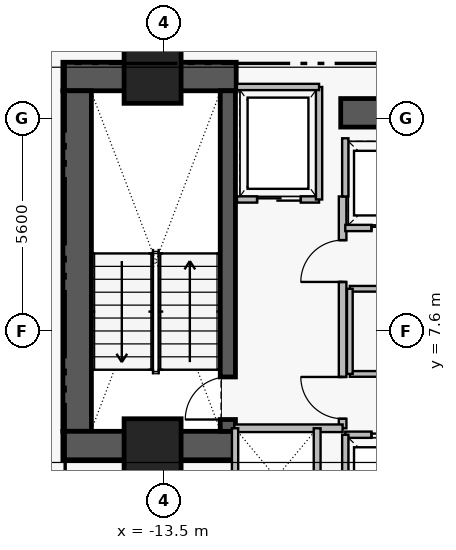
"""IFC4 building model, lengths in metres.
Left out: names, types, materials, properties, quantities, classifications, styles, units other than length and angle.
Written with IfcOpenShell. Run it as: python <this file> out.ifc"""

import sys

from ifc_helpers import new_model, si_unit, direction, frame, frame_2d, origin, origin_2d, place, context, subcontext, project, spatial, rectangle, extrude, element, fill, save


model = new_model("IFC4")
c1 = context("Model", 3, precision=1e-05, world=origin(), true_north=direction((0.0, 1.0)))
c2 = subcontext(c1, "Body", "Model", "MODEL_VIEW")
j1 = project(units=[si_unit("LENGTHUNIT", "METRE"), si_unit("PLANEANGLEUNIT", "RADIAN")], contexts=[c1])
p1 = place(None, origin())
s1 = spatial("IfcSite", under=j1, at=p1, CompositionType="ELEMENT")
p2 = place(p1, origin())
s2 = spatial("IfcBuilding", under=s1, at=p2, CompositionType="ELEMENT")
p3 = place(p2, frame((0.0, 0.0, 110.25)))
s3 = spatial("IfcBuildingStorey", under=s2, at=p3, CompositionType="ELEMENT", Elevation=110.25)
p4 = place(p3, frame((-16.16, 14.305, 0.0), z_axis=(0.0, 0.0, 1.0), x_axis=(1.0, 0.0, 0.0)))
e1 = element("IfcWall", 1, at=p4, inside=s3, PredefinedType="SHEAR", context=c2, shape_type="SweptSolid", body=[
    extrude(rectangle(XDim=4.56, YDim=0.75, at=frame_2d((2.28, 0.0))), origin(), (0.0, 0.0, 1.0), 3.46),
])
p5 = place(p3, frame((-15.785, 4.97, 0.0), z_axis=(0.0, 0.0, 1.0), x_axis=(0.0, 1.0, 0.0)))
e2 = element("IfcWall", 2, at=p5, inside=s3, PredefinedType="SHEAR", context=c2, shape_type="SweptSolid", body=[
    extrude(rectangle(XDim=8.96, YDim=0.75, at=frame_2d((4.48, 0.0))), origin(), (0.0, 0.0, 1.0), 3.46),
])
p6 = place(p3, frame((-16.16, 4.595, 0.0), z_axis=(0.0, 0.0, 1.0), x_axis=(1.0, 0.0, 0.0)))
e3 = element("IfcWall", 3, at=p6, inside=s3, PredefinedType="SHEAR", context=c2, shape_type="SweptSolid", body=[
    extrude(rectangle(XDim=4.56, YDim=0.75, at=frame_2d((2.28, 0.0))), origin(), (0.0, 0.0, 1.0), 3.46),
])
p7 = place(p3, frame((-8.85, 13.35, 0.0), z_axis=(0.0, 0.0, 1.0), x_axis=(1.0, 0.0, 0.0)))
e4 = element("IfcWall", 4, at=p7, inside=s3, PredefinedType="SHEAR", context=c2, shape_type="SweptSolid", body=[
    extrude(rectangle(XDim=7.6, YDim=0.75, at=frame_2d((3.8, 0.0))), origin(), (0.0, 0.0, 1.0), 3.43),
])
p8 = place(p3, frame((-11.82, 4.97, 0.0), z_axis=(0.0, 0.0, 1.0), x_axis=(0.0, 1.0, 0.0)))
e5 = element("IfcWall", 5, at=p8, inside=s3, PredefinedType="SHEAR", context=c2, shape_type="SweptSolid", body=[
    extrude(rectangle(XDim=8.96, YDim=0.4, at=frame_2d((4.48, 0.0))), origin(), (0.0, 0.0, 1.0), 3.46),
])
p9 = place(p8, frame((0.31, 0.0, 0.0)))
e6 = element("IfcOpeningElement", 6, at=p9, cuts=e5, PredefinedType="OPENING", context=c2, shape_type="SweptSolid", body=[
    extrude(rectangle(XDim=1.12, YDim=2.22, at=frame_2d((0.56, 1.11))), frame((0.0, 0.21, 0.0), z_axis=(0.0, -1.0, 0.0), x_axis=(1.0, 0.0, 0.0)), (0.0, 0.0, 1.0), 0.42),
])
for number, where, z_axis, x_axis in (
    (7, (-13.8, 14.35, 0.0), (0.0, 0.0, 1.0), (1.0, 0.0, 0.0)),
    (8, (-13.8, 4.55, 0.0), (0.0, 0.0, 1.0), (1.0, 0.0, 0.0)),
):
    element("IfcColumn", number, at=place(p3, frame(where, z_axis=z_axis, x_axis=x_axis)), inside=s3, PredefinedType="COLUMN", context=c2, shape_type="SweptSolid", body=[
        extrude(rectangle(XDim=1.5, YDim=1.5, at=origin_2d()), origin(), (0.0, 0.0, 1.0), 3.65),
    ])
p10 = place(p3, frame((-8.8, 5.05, 0.0), z_axis=(0.0, 0.0, 1.0), x_axis=(0.0, 1.0, 0.0)))
e9 = element("IfcWall", 9, at=p10, inside=s3, PredefinedType="PARTITIONING", context=c2, shape_type="SweptSolid", body=[
    extrude(rectangle(XDim=6.1, YDim=0.2, at=frame_2d((3.05, 0.0))), origin(), (0.0, 0.0, 1.0), 3.43),
])
p11 = place(p10, frame((0.25, 0.0, 0.0)))
e10 = element("IfcOpeningElement", 10, at=p11, cuts=e9, PredefinedType="OPENING", context=c2, shape_type="SweptSolid", body=[
    extrude(rectangle(XDim=1.1, YDim=2.2, at=frame_2d((0.55, 1.1))), frame((0.0, 0.11, 0.0), z_axis=(0.0, -1.0, 0.0), x_axis=(1.0, 0.0, 0.0)), (0.0, 0.0, 1.0), 0.22),
])
p12 = place(p10, frame((3.85, 0.0, 0.0)))
e11 = element("IfcOpeningElement", 11, at=p12, cuts=e9, PredefinedType="OPENING", context=c2, shape_type="SweptSolid", body=[
    extrude(rectangle(XDim=1.1, YDim=2.2, at=frame_2d((0.55, 1.1))), frame((0.0, 0.11, 0.0), z_axis=(0.0, -1.0, 0.0), x_axis=(1.0, 0.0, 0.0)), (0.0, 0.0, 1.0), 0.22),
])
p13 = place(p3, frame((-11.58, 11.07, 0.0), z_axis=(0.0, 0.0, 1.0), x_axis=(1.0, 0.0, 0.0)))
e12 = element("IfcWall", 12, at=p13, inside=s3, PredefinedType="PARTITIONING", context=c2, shape_type="SweptSolid", body=[
    extrude(rectangle(XDim=2.16, YDim=0.165, at=frame_2d((1.08, 0.0))), origin(), (0.0, 0.0, 1.0), 3.43),
])
p14 = place(p13, frame((0.53, 0.0, 0.0)))
e13 = element("IfcOpeningElement", 13, at=p14, cuts=e12, PredefinedType="OPENING", context=c2, shape_type="SweptSolid", body=[
    extrude(rectangle(XDim=1.15, YDim=2.25, at=frame_2d((0.575, 1.125))), frame((0.0, 0.093, 0.0), z_axis=(0.0, -1.0, 0.0), x_axis=(1.0, 0.0, 0.0)), (0.0, 0.0, 1.0), 0.185),
])
p15 = place(p3, frame((-8.73, 4.88, 0.0), z_axis=(0.0, 0.0, 1.0), x_axis=(1.0, 0.0, 0.0)))
e14 = element("IfcWall", 14, at=p15, inside=s3, PredefinedType="PARTITIONING", context=c2, shape_type="SweptSolid", body=[
    extrude(rectangle(XDim=2.48, YDim=0.165, at=frame_2d((1.24, 0.0))), origin(), (0.0, 0.0, 1.0), 3.43),
])
p16 = place(p15, frame((0.69, 0.0, 0.0)))
e15 = element("IfcOpeningElement", 15, at=p16, cuts=e14, PredefinedType="OPENING", context=c2, shape_type="SweptSolid", body=[
    extrude(rectangle(XDim=1.1, YDim=2.25, at=frame_2d((0.55, 1.125))), frame((0.0, 0.093, 0.0), z_axis=(0.0, -1.0, 0.0), x_axis=(1.0, 0.0, 0.0)), (0.0, 0.0, 1.0), 0.185),
])
p17 = place(p3, frame((-8.73, 10.32, 0.0), z_axis=(0.0, 0.0, 1.0), x_axis=(1.0, 0.0, 0.0)))
e16 = element("IfcWall", 16, at=p17, inside=s3, PredefinedType="PARTITIONING", context=c2, shape_type="SweptSolid", body=[
    extrude(rectangle(XDim=2.48, YDim=0.165, at=frame_2d((1.24, 0.0))), origin(), (0.0, 0.0, 1.0), 3.43),
])
p18 = place(p17, frame((0.69, 0.0, 0.0)))
e17 = element("IfcOpeningElement", 17, at=p18, cuts=e16, PredefinedType="OPENING", context=c2, shape_type="SweptSolid", body=[
    extrude(rectangle(XDim=1.1, YDim=2.25, at=frame_2d((0.55, 1.125))), frame((0.0, 0.093, 0.0), z_axis=(0.0, -1.0, 0.0), x_axis=(1.0, 0.0, 0.0)), (0.0, 0.0, 1.0), 0.185),
])
p19 = place(p3, frame((-8.61, 6.48, 0.0), z_axis=(0.0, 0.0, 1.0), x_axis=(1.0, 0.0, 0.0)))
e18 = element("IfcWall", 18, at=p19, inside=s3, PredefinedType="PARTITIONING", context=c2, shape_type="SweptSolid", body=[
    extrude(rectangle(XDim=3.62, YDim=0.15, at=frame_2d((1.81, 0.0))), origin(), (0.0, 0.0, 1.0), 3.43),
])
p20 = place(p19, frame((1.36, 0.0, 0.0)))
e19 = element("IfcOpeningElement", 19, at=p20, cuts=e18, PredefinedType="OPENING", context=c2, shape_type="SweptSolid", body=[
    extrude(rectangle(XDim=0.9, YDim=2.15, at=frame_2d((0.45, 1.075))), frame((0.0, 0.085, 0.0), z_axis=(0.0, -1.0, 0.0), x_axis=(1.0, 0.0, 0.0)), (0.0, 0.0, 1.0), 0.17),
])
p21 = place(p3, frame((-11.65, 5.05, 0.0), z_axis=(0.0, 0.0, 1.0), x_axis=(1.0, 0.0, 0.0)))
e20 = element("IfcWall", 20, at=p21, inside=s3, PredefinedType="PARTITIONING", context=c2, shape_type="SweptSolid", body=[
    extrude(rectangle(XDim=2.85, YDim=0.2, at=frame_2d((1.425, 0.0))), origin(), (0.0, 0.0, 1.0), 3.43),
])
p22 = place(p3, frame((-9.42, 11.07, 0.0), z_axis=(0.0, 0.0, 1.0), x_axis=(0.0, 1.0, 0.0)))
e21 = element("IfcWall", 21, at=p22, inside=s3, PredefinedType="PARTITIONING", context=c2, shape_type="SweptSolid", body=[
    extrude(rectangle(XDim=2.96, YDim=0.165, at=frame_2d((1.48, 0.0))), origin(), (0.0, 0.0, 1.0), 3.43),
])
p23 = place(p3, frame((-11.58, 14.03, 0.0), z_axis=(0.0, 0.0, 1.0), x_axis=(1.0, 0.0, 0.0)))
e22 = element("IfcWall", 22, at=p23, inside=s3, PredefinedType="PARTITIONING", context=c2, shape_type="SweptSolid", body=[
    extrude(rectangle(XDim=2.16, YDim=0.165, at=frame_2d((1.08, 0.0))), origin(), (0.0, 0.0, 1.0), 3.43),
])
p24 = place(p3, frame((-8.73, 2.52, 0.0), z_axis=(0.0, 0.0, 1.0), x_axis=(0.0, 1.0, 0.0)))
e23 = element("IfcWall", 23, at=p24, inside=s3, PredefinedType="PARTITIONING", context=c2, shape_type="SweptSolid", body=[
    extrude(rectangle(XDim=2.36, YDim=0.165, at=frame_2d((1.18, 0.0))), origin(), (0.0, 0.0, 1.0), 3.43),
])
p25 = place(p3, frame((-8.73, 11.15, 0.0), z_axis=(0.0, 0.0, 1.0), x_axis=(0.0, 1.0, 0.0)))
e24 = element("IfcWall", 24, at=p25, inside=s3, PredefinedType="PARTITIONING", context=c2, shape_type="SweptSolid", body=[
    extrude(rectangle(XDim=1.53, YDim=0.165, at=frame_2d((0.765, 0.0))), origin(), (0.0, 0.0, 1.0), 3.43),
])
p26 = place(p3, frame((-9.47, 2.45, 0.0), z_axis=(0.0, 0.0, 1.0), x_axis=(0.0, 1.0, 0.0)))
e25 = element("IfcWall", 25, at=p26, inside=s3, PredefinedType="PARTITIONING", context=c2, shape_type="SweptSolid", body=[
    extrude(rectangle(XDim=2.6, YDim=0.18, at=frame_2d((1.3, 0.0))), origin(), (0.0, 0.0, 1.0), 3.43),
])
p27 = place(p3, frame((-11.63, 2.47, 0.0), z_axis=(0.0, 0.0, 1.0), x_axis=(0.0, 1.0, 0.0)))
e26 = element("IfcWall", 26, at=p27, inside=s3, PredefinedType="PARTITIONING", context=c2, shape_type="SweptSolid", body=[
    extrude(rectangle(XDim=2.58, YDim=0.165, at=frame_2d((1.29, 0.0))), origin(), (0.0, 0.0, 1.0), 3.43),
])
p28 = place(p3, frame((-8.61, 8.72, 0.0), z_axis=(0.0, 0.0, 1.0), x_axis=(1.0, 0.0, 0.0)))
e27 = element("IfcWall", 27, at=p28, inside=s3, PredefinedType="PARTITIONING", context=c2, shape_type="SweptSolid", body=[
    extrude(rectangle(XDim=3.62, YDim=0.15, at=frame_2d((1.81, 0.0))), origin(), (0.0, 0.0, 1.0), 3.43),
])
p29 = place(p3, frame((-8.61, 6.48, 0.0), z_axis=(0.0, 0.0, 1.0), x_axis=(0.0, 1.0, 0.0)))
e28 = element("IfcWall", 28, at=p29, inside=s3, PredefinedType="PARTITIONING", context=c2, shape_type="SweptSolid", body=[
    extrude(rectangle(XDim=2.24, YDim=0.15, at=frame_2d((1.12, 0.0))), origin(), (0.0, 0.0, 1.0), 3.43),
])
p30 = place(p9, origin())
e29 = element("IfcDoor", 29, at=p30, inside=s3, OperationType="SINGLE_SWING_LEFT", PredefinedType="DOOR", context=c2, shape_type="SweptSolid", body=[
    extrude(rectangle(XDim=1.12, YDim=2.22, at=frame_2d((0.56, 1.11))), frame((0.0, 0.025, 0.0), z_axis=(0.0, -1.0, 0.0), x_axis=(1.0, 0.0, 0.0)), (0.0, 0.0, 1.0), 0.05),
])
fill(e6, e29)
p31 = place(p11, origin())
e30 = element("IfcDoor", 30, at=p31, inside=s3, OperationType="SINGLE_SWING_RIGHT", PredefinedType="DOOR", context=c2, shape_type="SweptSolid", body=[
    extrude(rectangle(XDim=1.1, YDim=2.2, at=frame_2d((0.55, 1.1))), frame((0.0, 0.025, 0.0), z_axis=(0.0, -1.0, 0.0), x_axis=(1.0, 0.0, 0.0)), (0.0, 0.0, 1.0), 0.05),
])
fill(e10, e30)
p32 = place(p12, origin())
e31 = element("IfcDoor", 31, at=p32, inside=s3, OperationType="SINGLE_SWING_LEFT", PredefinedType="DOOR", context=c2, shape_type="SweptSolid", body=[
    extrude(rectangle(XDim=1.1, YDim=2.2, at=frame_2d((0.55, 1.1))), frame((0.0, 0.025, 0.0), z_axis=(0.0, -1.0, 0.0), x_axis=(1.0, 0.0, 0.0)), (0.0, 0.0, 1.0), 0.05),
])
fill(e11, e31)
p33 = place(p14, origin())
e32 = element("IfcDoor", 32, at=p33, inside=s3, OperationType="SLIDING_TO_LEFT", PredefinedType="DOOR", context=c2, shape_type="SweptSolid", body=[
    extrude(rectangle(XDim=1.15, YDim=2.25, at=frame_2d((0.575, 1.125))), frame((0.0, 0.025, 0.0), z_axis=(0.0, -1.0, 0.0), x_axis=(1.0, 0.0, 0.0)), (0.0, 0.0, 1.0), 0.05),
])
fill(e13, e32)
p34 = place(p16, origin())
e33 = element("IfcDoor", 33, at=p34, inside=s3, OperationType="SLIDING_TO_LEFT", PredefinedType="DOOR", context=c2, shape_type="SweptSolid", body=[
    extrude(rectangle(XDim=1.1, YDim=2.25, at=frame_2d((0.55, 1.125))), frame((0.0, 0.025, 0.0), z_axis=(0.0, -1.0, 0.0), x_axis=(1.0, 0.0, 0.0)), (0.0, 0.0, 1.0), 0.05),
])
fill(e15, e33)
p35 = place(p18, origin())
e34 = element("IfcDoor", 34, at=p35, inside=s3, OperationType="SLIDING_TO_LEFT", PredefinedType="DOOR", context=c2, shape_type="SweptSolid", body=[
    extrude(rectangle(XDim=1.1, YDim=2.25, at=frame_2d((0.55, 1.125))), frame((0.0, 0.025, 0.0), z_axis=(0.0, -1.0, 0.0), x_axis=(1.0, 0.0, 0.0)), (0.0, 0.0, 1.0), 0.05),
])
fill(e17, e34)
save(model, sys.argv[1])
